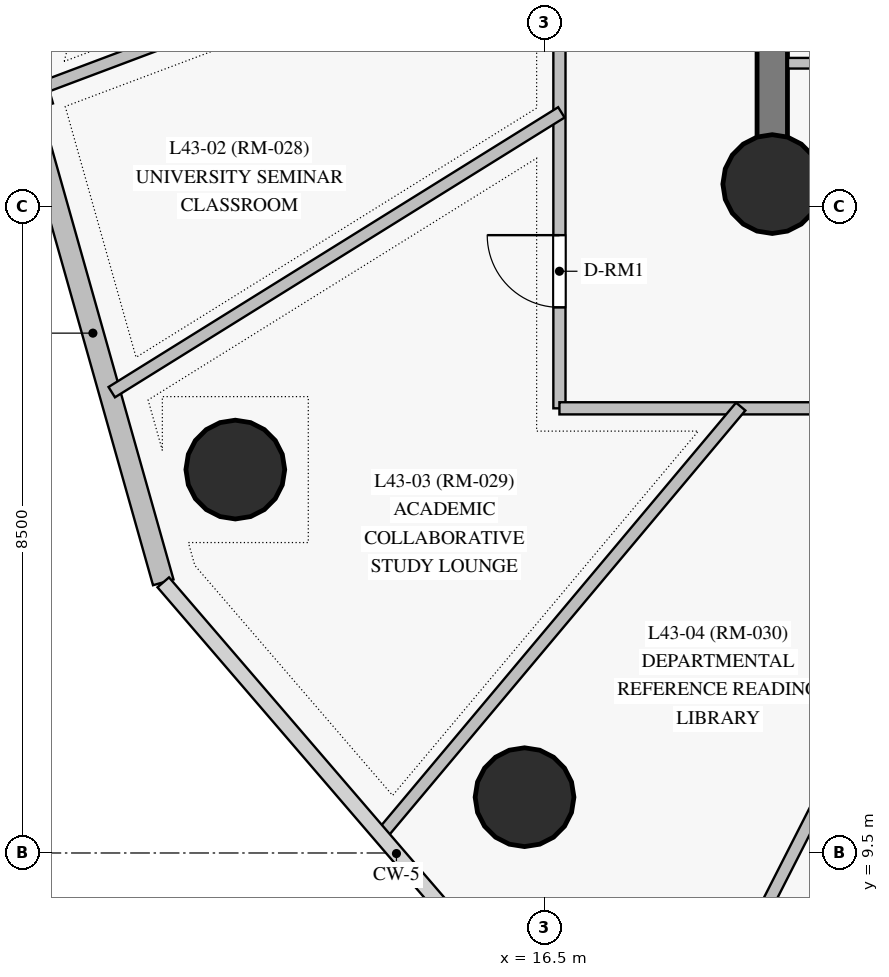
"""IFC4 building model, lengths in metres.
Left out: names, types, materials, properties, quantities, classifications, styles, units other than length and angle.
Written with IfcOpenShell. Run it as: python <this file> out.ifc"""

import sys

from ifc_helpers import new_model, si_unit, direction, frame, frame_2d, origin, origin_with_axes, origin_2d, place, context, subcontext, project, spatial, rectangle, circle, extrude, source, transform, mapped, element, fill, save


model = new_model("IFC4")
c1 = context("Model", 3, precision=1e-05, world=origin(), true_north=direction((0.0, 1.0)))
c2 = subcontext(c1, "Body", "Model", "MODEL_VIEW")
j1 = project(units=[si_unit("LENGTHUNIT", "METRE"), si_unit("PLANEANGLEUNIT", "RADIAN")], contexts=[c1])
p1 = place(None, origin())
s1 = spatial("IfcSite", under=j1, at=p1, CompositionType="ELEMENT")
p2 = place(p1, origin())
s2 = spatial("IfcBuilding", under=s1, at=p2, CompositionType="ELEMENT")
p3 = place(p2, frame((0.0, 0.0, 152.55)))
s3 = spatial("IfcBuildingStorey", under=s2, at=p3, CompositionType="ELEMENT", Elevation=152.55)
p4 = place(p3, frame((19.5, 18.3, 0.0), z_axis=(0.0, 0.0, 1.0), x_axis=(1.0, 0.0, 0.0)))
e1 = element("IfcWall", 1, at=p4, inside=s3, PredefinedType="SHEAR", context=c2, shape_type="SweptSolid", body=[
    extrude(rectangle(XDim=7.05, YDim=0.4, at=frame_2d((3.525, 0.0))), origin(), (0.0, 0.0, 1.0), 3.775),
])
p5 = place(p4, frame((4.2, 0.0, 0.0)))
e2 = element("IfcOpeningElement", 2, at=p5, cuts=e1, PredefinedType="OPENING", context=c2, shape_type="SweptSolid", body=[
    extrude(rectangle(XDim=1.4, YDim=2.2, at=frame_2d((0.7, 1.1))), frame((0.0, 0.21, 0.0), z_axis=(0.0, -1.0, 0.0), x_axis=(1.0, 0.0, 0.0)), (0.0, 0.0, 1.0), 0.42),
])
p6 = place(p3, frame((19.5, 34.7, 0.0), z_axis=(0.0, 0.0, 1.0), x_axis=(0.0, -1.0, 0.0)))
e3 = element("IfcWall", 3, at=p6, inside=s3, PredefinedType="SHEAR", context=c2, shape_type="SweptSolid", body=[
    extrude(rectangle(XDim=16.4, YDim=0.4, at=frame_2d((8.2, 0.0))), origin(), (0.0, 0.0, 1.0), 3.775),
])
p7 = place(p6, frame((3.1, 0.0, 0.0)))
e4 = element("IfcOpeningElement", 4, at=p7, cuts=e3, PredefinedType="OPENING", context=c2, shape_type="SweptSolid", body=[
    extrude(rectangle(XDim=1.1, YDim=2.15, at=frame_2d((0.55, 1.075))), frame((0.0, 0.21, 0.0), z_axis=(0.0, -1.0, 0.0), x_axis=(1.0, 0.0, 0.0)), (0.0, 0.0, 1.0), 0.42),
])
m1 = source(origin_with_axes(), c2, "Body", "SweptSolid", [
    extrude(circle(Radius=0.65, at=origin_2d()), origin(), (0.0, 0.0, 1.0), 4.0),
])
for number, where, z_axis, x_axis in (
    (5, (19.5, 18.3, 0.0), (0.0, 0.0, 1.0), (1.0, 0.0, 0.0)),
    (6, (12.436, 14.544, 0.0), (0.0, 0.0, 1.0), (1.0, 0.0, 0.0)),
    (7, (16.241, 10.234, 0.0), (0.0, 0.0, 1.0), (1.0, 0.0, 0.0)),
):
    element("IfcColumn", number, at=place(p3, frame(where, z_axis=z_axis, x_axis=x_axis)), inside=s3, PredefinedType="COLUMN", context=c2, shape_type="MappedRepresentation", body=[
        mapped(m1, transform((0.0, 0.0, 0.0), scale=1.0)),
    ])
p8 = place(p3, frame((9.637, 19.618, 0.0), z_axis=(0.0, 0.0, 1.0), x_axis=(0.271681437249, -0.96238723841, 0.0)))
e8 = element("IfcWall", 8, at=p8, inside=s3, PredefinedType="SOLIDWALL", context=c2, shape_type="SweptSolid", body=[
    extrude(rectangle(XDim=6.813, YDim=0.28, at=frame_2d((3.407, 0.0))), origin(), (0.0, 0.0, 1.0), 3.445),
])
p9 = place(p3, frame((15.117, 41.47, 0.0), z_axis=(0.0, 0.0, 1.0), x_axis=(-0.243272448764, -0.96995799686, 0.0)))
e9 = element("IfcWall", 9, at=p9, inside=s3, PredefinedType="SOLIDWALL", context=c2, shape_type="SweptSolid", body=[
    extrude(rectangle(XDim=22.529, YDim=0.28, at=frame_2d((11.265, 0.0))), origin(), (0.0, 0.0, 1.0), 3.445),
])
p10 = place(p9, frame((3.473, 0.0, 0.85)))
e10 = element("IfcOpeningElement", 10, at=p10, cuts=e9, PredefinedType="OPENING", context=c2, shape_type="SweptSolid", body=[
    extrude(rectangle(XDim=0.95, YDim=1.5, at=frame_2d((0.475, 0.75))), frame((0.0, 0.15, 0.0), z_axis=(0.0, -1.0, 0.0), x_axis=(1.0, 0.0, 0.0)), (0.0, 0.0, 1.0), 0.3),
])
p11 = place(p9, frame((12.108, 0.0, 0.85)))
e11 = element("IfcOpeningElement", 11, at=p11, cuts=e9, PredefinedType="OPENING", context=c2, shape_type="SweptSolid", body=[
    extrude(rectangle(XDim=1.75, YDim=1.65, at=frame_2d((0.875, 0.825))), frame((0.0, 0.15, 0.0), z_axis=(0.0, -1.0, 0.0), x_axis=(1.0, 0.0, 0.0)), (0.0, 0.0, 1.0), 0.3),
])
p12 = place(p9, frame((17.049, 0.0, 0.85)))
e12 = element("IfcOpeningElement", 12, at=p12, cuts=e9, PredefinedType="OPENING", context=c2, shape_type="SweptSolid", body=[
    extrude(rectangle(XDim=1.75, YDim=1.65, at=frame_2d((0.875, 0.825))), frame((0.0, 0.15, 0.0), z_axis=(0.0, -1.0, 0.0), x_axis=(1.0, 0.0, 0.0)), (0.0, 0.0, 1.0), 0.3),
])
p13 = place(p9, frame((9.801, 0.0, 0.0)))
e13 = element("IfcOpeningElement", 13, at=p13, cuts=e9, PredefinedType="OPENING", context=c2, shape_type="SweptSolid", body=[
    extrude(rectangle(XDim=1.05, YDim=2.12, at=frame_2d((0.525, 1.06))), frame((0.0, 0.15, 0.0), z_axis=(0.0, -1.0, 0.0), x_axis=(1.0, 0.0, 0.0)), (0.0, 0.0, 1.0), 0.3),
])
p14 = place(p3, frame((16.7, 15.35, 0.0), z_axis=(0.0, 0.0, 1.0), x_axis=(0.0, 1.0, 0.0)))
e14 = element("IfcWall", 14, at=p14, inside=s3, PredefinedType="PARTITIONING", context=c2, shape_type="SweptSolid", body=[
    extrude(rectangle(XDim=22.3, YDim=0.16, at=frame_2d((11.15, 0.0))), origin(), (0.0, 0.0, 1.0), 2.975),
])
p15 = place(p14, frame((7.33, 0.0, 0.0)))
e15 = element("IfcOpeningElement", 15, at=p15, cuts=e14, PredefinedType="OPENING", context=c2, shape_type="SweptSolid", body=[
    extrude(rectangle(XDim=0.95, YDim=2.15, at=frame_2d((0.475, 1.075))), frame((0.0, 0.09, 0.0), z_axis=(0.0, -1.0, 0.0), x_axis=(1.0, 0.0, 0.0)), (0.0, 0.0, 1.0), 0.18),
])
p16 = place(p14, frame((5.1, 0.0, 0.0)))
e16 = element("IfcOpeningElement", 16, at=p16, cuts=e14, PredefinedType="OPENING", context=c2, shape_type="SweptSolid", body=[
    extrude(rectangle(XDim=0.96, YDim=2.15, at=frame_2d((0.48, 1.075))), frame((0.0, 0.09, 0.0), z_axis=(0.0, -1.0, 0.0), x_axis=(1.0, 0.0, 0.0)), (0.0, 0.0, 1.0), 0.18),
])
p17 = place(p14, frame((1.328, 0.0, 0.0)))
e17 = element("IfcOpeningElement", 17, at=p17, cuts=e14, PredefinedType="OPENING", context=c2, shape_type="SweptSolid", body=[
    extrude(rectangle(XDim=0.95, YDim=2.15, at=frame_2d((0.475, 1.075))), frame((0.0, 0.09, 0.0), z_axis=(0.0, -1.0, 0.0), x_axis=(1.0, 0.0, 0.0)), (0.0, 0.0, 1.0), 0.18),
])
p18 = place(p14, frame((14.02, 0.0, 0.0)))
e18 = element("IfcOpeningElement", 18, at=p18, cuts=e14, PredefinedType="OPENING", context=c2, shape_type="SweptSolid", body=[
    extrude(rectangle(XDim=0.95, YDim=2.15, at=frame_2d((0.475, 1.075))), frame((0.0, 0.09, 0.0), z_axis=(0.0, -1.0, 0.0), x_axis=(1.0, 0.0, 0.0)), (0.0, 0.0, 1.0), 0.18),
])
p19 = place(p3, frame((27.55, 15.35, 0.0), z_axis=(0.0, 0.0, 1.0), x_axis=(-1.0, 0.0, 0.0)))
e19 = element("IfcWall", 19, at=p19, inside=s3, PredefinedType="PARTITIONING", context=c2, shape_type="SweptSolid", body=[
    extrude(rectangle(XDim=10.85, YDim=0.16, at=frame_2d((5.425, 0.0))), origin(), (0.0, 0.0, 1.0), 3.325),
])
p20 = place(p19, frame((5.29, 0.0, 0.0)))
e20 = element("IfcOpeningElement", 20, at=p20, cuts=e19, PredefinedType="OPENING", context=c2, shape_type="SweptSolid", body=[
    extrude(rectangle(XDim=0.95, YDim=2.15, at=frame_2d((0.475, 1.075))), frame((0.0, 0.09, 0.0), z_axis=(0.0, -1.0, 0.0), x_axis=(1.0, 0.0, 0.0)), (0.0, 0.0, 1.0), 0.18),
])
p21 = place(p19, frame((3.323, 0.0, 0.0)))
e21 = element("IfcOpeningElement", 21, at=p21, cuts=e19, PredefinedType="OPENING", context=c2, shape_type="SweptSolid", body=[
    extrude(rectangle(XDim=0.95, YDim=2.15, at=frame_2d((0.475, 1.075))), frame((0.0, 0.09, 0.0), z_axis=(0.0, -1.0, 0.0), x_axis=(1.0, 0.0, 0.0)), (0.0, 0.0, 1.0), 0.18),
])
p22 = place(p3, frame((22.771, 15.377, 0.0), z_axis=(0.0, 0.0, 1.0), x_axis=(-0.453637892893, -0.891186098484, 0.0)))
e22 = element("IfcWall", 22, at=p22, inside=s3, PredefinedType="PARTITIONING", context=c2, shape_type="SweptSolid", body=[
    extrude(rectangle(XDim=10.698, YDim=0.16, at=frame_2d((5.349, 0.0))), origin(), (0.0, 0.0, 1.0), 3.775),
])
p23 = place(p3, frame((16.728, 22.139, 0.0), z_axis=(0.0, 0.0, 1.0), x_axis=(-0.936043012374, -0.351885604971, 0.0)))
e23 = element("IfcWall", 23, at=p23, inside=s3, PredefinedType="PARTITIONING", context=c2, shape_type="SweptSolid", body=[
    extrude(rectangle(XDim=7.511, YDim=0.16, at=frame_2d((3.756, 0.0))), origin(), (0.0, 0.0, 1.0), 3.775),
])
p24 = place(p3, frame((19.085, 15.373, 0.0), z_axis=(0.0, 0.0, 1.0), x_axis=(-0.642788640308, -0.766043578324, 0.0)))
e24 = element("IfcWall", 24, at=p24, inside=s3, PredefinedType="PARTITIONING", context=c2, shape_type="SweptSolid", body=[
    extrude(rectangle(XDim=7.339, YDim=0.16, at=frame_2d((3.669, 0.0))), origin(), (0.0, 0.0, 1.0), 2.975),
])
p25 = place(p3, frame((16.726, 19.243, 0.0), z_axis=(0.0, 0.0, 1.0), x_axis=(-0.849038090378, -0.528331639301, 0.0)))
e25 = element("IfcWall", 25, at=p25, inside=s3, PredefinedType="PARTITIONING", context=c2, shape_type="SweptSolid", body=[
    extrude(rectangle(XDim=6.967, YDim=0.16, at=frame_2d((3.483, 0.0))), origin(), (0.0, 0.0, 1.0), 3.775),
])
p26 = place(p3, frame((19.707, 19.89, 0.0), z_axis=(0.0, 0.0, 1.0), x_axis=(1.0, 0.0, 0.0)))
e26 = element("IfcWall", 26, at=p26, inside=s3, PredefinedType="PARTITIONING", context=c2, shape_type="SweptSolid", body=[
    extrude(rectangle(XDim=3.79, YDim=0.14, at=frame_2d((1.895, 0.0))), origin(), (0.0, 0.0, 1.0), 3.775),
])
m2 = source(origin_with_axes(), c2, "Body", "SweptSolid", [
    extrude(rectangle(XDim=0.95, YDim=2.15, at=frame_2d((0.475, 1.075))), frame((0.0, 0.025, 0.0), z_axis=(0.0, -1.0, 0.0), x_axis=(1.0, 0.0, 0.0)), (0.0, 0.0, 1.0), 0.05),
])
p27 = place(p17, origin())
e27 = element("IfcDoor", 27, at=p27, inside=s3, OperationType="SINGLE_SWING_RIGHT", PredefinedType="DOOR", context=c2, shape_type="MappedRepresentation", body=[
    mapped(m2, transform((0.0, 0.0, 0.0), scale=1.0)),
])
fill(e17, e27)
save(model, sys.argv[1])
